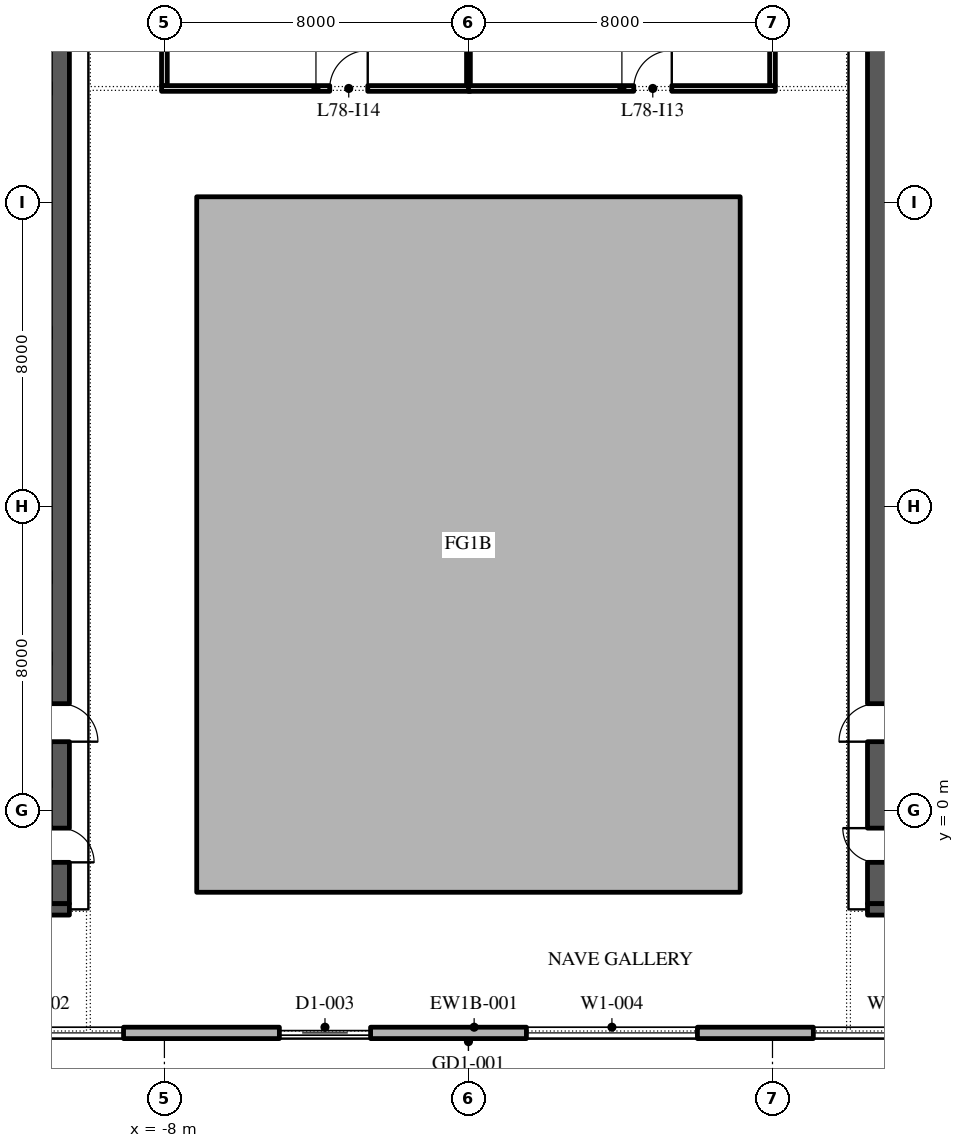
"""IFC4 building model, lengths in metres.
Left out: names, types, materials, properties, quantities, classifications, styles, units other than length and angle.
Written with IfcOpenShell. Run it as: python <this file> out.ifc"""

import sys

from ifc_helpers import new_model, si_unit, direction, frame, frame_2d, origin, place, context, subcontext, project, spatial, polyline, rectangle, outline, extrude, element, fill, save


model = new_model("IFC4")
c1 = context("Model", 3, precision=1e-05, world=origin(), true_north=direction((0.0, 1.0)))
c2 = subcontext(c1, "Body", "Model", "MODEL_VIEW")
j1 = project(units=[si_unit("LENGTHUNIT", "METRE"), si_unit("PLANEANGLEUNIT", "RADIAN")], contexts=[c1])
p1 = place(None, origin())
s1 = spatial("IfcSite", under=j1, at=p1, CompositionType="ELEMENT")
p2 = place(p1, origin())
s2 = spatial("IfcBuilding", under=s1, at=p2, CompositionType="ELEMENT")
p3 = place(p2, frame((0.0, 0.0, 355.2)))
s3 = spatial("IfcBuildingStorey", under=s2, at=p3, CompositionType="ELEMENT", Elevation=355.2)
p4 = place(p3, origin())
e1 = element("IfcWall", 1, at=p4, inside=s3, PredefinedType="STANDARD", context=c2, shape_type="SweptSolid", body=[
    extrude(outline(polyline([(-7.15, -2.15), (7.15, -2.15), (7.15, 16.15), (-7.15, 16.15), (-7.15, -2.15)]), holes=[polyline([(-7.0, -2.0), (-7.0, 16.0), (7.0, 16.0), (7.0, -2.0), (-7.0, -2.0)])]), origin(), (0.0, 0.0, 1.0), 3.95),
])
p5 = place(p3, frame((-22.35, -5.85, 0.0), z_axis=(0.0, 0.0, 1.0), x_axis=(1.0, 0.0, 0.0)))
e2 = element("IfcWall", 2, at=p5, inside=s3, PredefinedType="STANDARD", context=c2, shape_type="SweptSolid", body=[
    extrude(rectangle(XDim=45.0, YDim=0.3, at=frame_2d((22.5, 0.0))), origin(), (0.0, 0.0, 1.0), 3.95),
])
p6 = place(p5, frame((1.375, 0.0, 0.45)))
e3 = element("IfcOpeningElement", 3, at=p6, cuts=e2, PredefinedType="OPENING", context=c2, shape_type="SweptSolid", body=[
    extrude(rectangle(XDim=4.5, YDim=3.05, at=frame_2d((2.25, 1.525))), frame((0.0, 0.16, 0.0), z_axis=(0.0, -1.0, 0.0), x_axis=(1.0, 0.0, 0.0)), (0.0, 0.0, 1.0), 0.32),
])
p7 = place(p5, frame((8.775, 0.0, 0.45)))
e4 = element("IfcOpeningElement", 4, at=p7, cuts=e2, PredefinedType="OPENING", context=c2, shape_type="SweptSolid", body=[
    extrude(rectangle(XDim=4.5, YDim=3.05, at=frame_2d((2.25, 1.525))), frame((0.0, 0.16, 0.0), z_axis=(0.0, -1.0, 0.0), x_axis=(1.0, 0.0, 0.0)), (0.0, 0.0, 1.0), 0.32),
])
p8 = place(p5, frame((17.375, 0.0, 0.0)))
e5 = element("IfcOpeningElement", 5, at=p8, cuts=e2, PredefinedType="OPENING", context=c2, shape_type="SweptSolid", body=[
    extrude(rectangle(XDim=2.4, YDim=3.5, at=frame_2d((1.2, 1.75))), frame((0.0, 0.16, 0.0), z_axis=(0.0, -1.0, 0.0), x_axis=(1.0, 0.0, 0.0)), (0.0, 0.0, 1.0), 0.32),
])
p9 = place(p5, frame((23.875, 0.0, 0.45)))
e6 = element("IfcOpeningElement", 6, at=p9, cuts=e2, PredefinedType="OPENING", context=c2, shape_type="SweptSolid", body=[
    extrude(rectangle(XDim=4.5, YDim=3.05, at=frame_2d((2.25, 1.525))), frame((0.0, 0.16, 0.0), z_axis=(0.0, -1.0, 0.0), x_axis=(1.0, 0.0, 0.0)), (0.0, 0.0, 1.0), 0.32),
])
p10 = place(p5, frame((31.425, 0.0, 0.45)))
e7 = element("IfcOpeningElement", 7, at=p10, cuts=e2, PredefinedType="OPENING", context=c2, shape_type="SweptSolid", body=[
    extrude(rectangle(XDim=4.5, YDim=3.05, at=frame_2d((2.25, 1.525))), frame((0.0, 0.16, 0.0), z_axis=(0.0, -1.0, 0.0), x_axis=(1.0, 0.0, 0.0)), (0.0, 0.0, 1.0), 0.32),
])
p11 = place(p5, frame((38.975, 0.0, 0.45)))
e8 = element("IfcOpeningElement", 8, at=p11, cuts=e2, PredefinedType="OPENING", context=c2, shape_type="SweptSolid", body=[
    extrude(rectangle(XDim=4.5, YDim=3.05, at=frame_2d((2.25, 1.525))), frame((0.0, 0.16, 0.0), z_axis=(0.0, -1.0, 0.0), x_axis=(1.0, 0.0, 0.0)), (0.0, 0.0, 1.0), 0.32),
])
p12 = place(p3, frame((-10.75, -2.45, 0.0), z_axis=(0.0, 0.0, 1.0), x_axis=(0.0, 1.0, 0.0)))
e9 = element("IfcWall", 9, at=p12, inside=s3, PredefinedType="SHEAR", context=c2, shape_type="SweptSolid", body=[
    extrude(rectangle(XDim=27.9, YDim=0.5, at=frame_2d((13.95, 0.0))), origin(), (0.0, 0.0, 1.0), 3.95),
])
p13 = place(p12, frame((23.65, 0.0, 0.0)))
e10 = element("IfcOpeningElement", 10, at=p13, cuts=e9, PredefinedType="OPENING", context=c2, shape_type="SweptSolid", body=[
    extrude(rectangle(XDim=2.4, YDim=2.1, at=frame_2d((1.2, 1.05))), frame((0.0, 0.26, 0.0), z_axis=(0.0, -1.0, 0.0), x_axis=(1.0, 0.0, 0.0)), (0.0, 0.0, 1.0), 0.52),
])
p14 = place(p12, frame((1.087, 0.0, 0.0)))
e11 = element("IfcOpeningElement", 11, at=p14, cuts=e9, PredefinedType="OPENING", context=c2, shape_type="SweptSolid", body=[
    extrude(rectangle(XDim=0.9, YDim=2.1, at=frame_2d((0.45, 1.05))), frame((0.0, 0.26, 0.0), z_axis=(0.0, -1.0, 0.0), x_axis=(1.0, 0.0, 0.0)), (0.0, 0.0, 1.0), 0.52),
])
p15 = place(p12, frame((4.262, 0.0, 0.0)))
e12 = element("IfcOpeningElement", 12, at=p15, cuts=e9, PredefinedType="OPENING", context=c2, shape_type="SweptSolid", body=[
    extrude(rectangle(XDim=1.0, YDim=2.1, at=frame_2d((0.5, 1.05))), frame((0.0, 0.26, 0.0), z_axis=(0.0, -1.0, 0.0), x_axis=(1.0, 0.0, 0.0)), (0.0, 0.0, 1.0), 0.52),
])
p16 = place(p3, frame((-21.5, -2.6, 0.0), z_axis=(0.0, 0.0, 1.0), x_axis=(1.0, 0.0, 0.0)))
e13 = element("IfcWall", 13, at=p16, inside=s3, PredefinedType="SHEAR", context=c2, shape_type="SweptSolid", body=[
    extrude(rectangle(XDim=11.0, YDim=0.3, at=frame_2d((5.5, 0.0))), origin(), (0.0, 0.0, 1.0), 3.95),
])
p17 = place(p3, frame((10.75, -2.45, 0.0), z_axis=(0.0, 0.0, 1.0), x_axis=(0.0, 1.0, 0.0)))
e14 = element("IfcWall", 14, at=p17, inside=s3, PredefinedType="SHEAR", context=c2, shape_type="SweptSolid", body=[
    extrude(rectangle(XDim=27.9, YDim=0.5, at=frame_2d((13.95, 0.0))), origin(), (0.0, 0.0, 1.0), 3.95),
])
p18 = place(p17, frame((23.65, 0.0, 0.0)))
e15 = element("IfcOpeningElement", 15, at=p18, cuts=e14, PredefinedType="OPENING", context=c2, shape_type="SweptSolid", body=[
    extrude(rectangle(XDim=2.4, YDim=2.1, at=frame_2d((1.2, 1.05))), frame((0.0, 0.26, 0.0), z_axis=(0.0, -1.0, 0.0), x_axis=(1.0, 0.0, 0.0)), (0.0, 0.0, 1.0), 0.52),
])
p19 = place(p17, frame((1.087, 0.0, 0.0)))
e16 = element("IfcOpeningElement", 16, at=p19, cuts=e14, PredefinedType="OPENING", context=c2, shape_type="SweptSolid", body=[
    extrude(rectangle(XDim=0.9, YDim=2.1, at=frame_2d((0.45, 1.05))), frame((0.0, 0.26, 0.0), z_axis=(0.0, -1.0, 0.0), x_axis=(1.0, 0.0, 0.0)), (0.0, 0.0, 1.0), 0.52),
])
p20 = place(p17, frame((4.262, 0.0, 0.0)))
e17 = element("IfcOpeningElement", 17, at=p20, cuts=e14, PredefinedType="OPENING", context=c2, shape_type="SweptSolid", body=[
    extrude(rectangle(XDim=1.0, YDim=2.1, at=frame_2d((0.5, 1.05))), frame((0.0, 0.26, 0.0), z_axis=(0.0, -1.0, 0.0), x_axis=(1.0, 0.0, 0.0)), (0.0, 0.0, 1.0), 0.52),
])
p21 = place(p3, frame((10.5, -2.6, 0.0), z_axis=(0.0, 0.0, 1.0), x_axis=(1.0, 0.0, 0.0)))
e18 = element("IfcWall", 18, at=p21, inside=s3, PredefinedType="SHEAR", context=c2, shape_type="SweptSolid", body=[
    extrude(rectangle(XDim=11.0, YDim=0.3, at=frame_2d((5.5, 0.0))), origin(), (0.0, 0.0, 1.0), 3.95),
])
p22 = place(p3, frame((-8.075, 19.0, 0.0), z_axis=(0.0, 0.0, 1.0), x_axis=(1.0, 0.0, 0.0)))
e19 = element("IfcWall", 19, at=p22, inside=s3, PredefinedType="PARTITIONING", context=c2, shape_type="SweptSolid", body=[
    extrude(rectangle(XDim=8.125, YDim=0.15, at=frame_2d((4.062, 0.0))), origin(), (0.0, 0.0, 1.0), 3.95),
])
p23 = place(p22, frame((4.425, 0.0, 0.0)))
e20 = element("IfcOpeningElement", 20, at=p23, cuts=e19, PredefinedType="OPENING", context=c2, shape_type="SweptSolid", body=[
    extrude(rectangle(XDim=1.0, YDim=2.1, at=frame_2d((0.5, 1.05))), frame((0.0, 0.085, 0.0), z_axis=(0.0, -1.0, 0.0), x_axis=(1.0, 0.0, 0.0)), (0.0, 0.0, 1.0), 0.17),
])
p24 = place(p3, frame((-8.0, 26.45, 0.0), z_axis=(0.0, 0.0, 1.0), x_axis=(0.0, -1.0, 0.0)))
e21 = element("IfcWall", 21, at=p24, inside=s3, PredefinedType="PARTITIONING", context=c2, shape_type="SweptSolid", body=[
    extrude(rectangle(XDim=7.375, YDim=0.15, at=frame_2d((3.688, 0.0))), origin(), (0.0, 0.0, 1.0), 3.95),
])
p25 = place(p3, frame((0.0, 19.075, 0.0), z_axis=(0.0, 0.0, 1.0), x_axis=(0.0, 1.0, 0.0)))
e22 = element("IfcWall", 22, at=p25, inside=s3, PredefinedType="PARTITIONING", context=c2, shape_type="SweptSolid", body=[
    extrude(rectangle(XDim=7.475, YDim=0.1, at=frame_2d((3.738, 0.0))), origin(), (0.0, 0.0, 1.0), 3.95),
])
p26 = place(p3, frame((0.0, 19.0, 0.0), z_axis=(0.0, 0.0, 1.0), x_axis=(1.0, 0.0, 0.0)))
e23 = element("IfcWall", 23, at=p26, inside=s3, PredefinedType="PARTITIONING", context=c2, shape_type="SweptSolid", body=[
    extrude(rectangle(XDim=8.075, YDim=0.15, at=frame_2d((4.038, 0.0))), origin(), (0.0, 0.0, 1.0), 3.95),
])
p27 = place(p26, frame((4.35, 0.0, 0.0)))
e24 = element("IfcOpeningElement", 24, at=p27, cuts=e23, PredefinedType="OPENING", context=c2, shape_type="SweptSolid", body=[
    extrude(rectangle(XDim=1.0, YDim=2.1, at=frame_2d((0.5, 1.05))), frame((0.0, 0.085, 0.0), z_axis=(0.0, -1.0, 0.0), x_axis=(1.0, 0.0, 0.0)), (0.0, 0.0, 1.0), 0.17),
])
p28 = place(p3, frame((8.0, 19.075, 0.0), z_axis=(0.0, 0.0, 1.0), x_axis=(0.0, 1.0, 0.0)))
e25 = element("IfcWall", 25, at=p28, inside=s3, PredefinedType="PARTITIONING", context=c2, shape_type="SweptSolid", body=[
    extrude(rectangle(XDim=7.425, YDim=0.15, at=frame_2d((3.712, 0.0))), origin(), (0.0, 0.0, 1.0), 3.95),
])
p29 = place(p7, origin())
e26 = element("IfcWindow", 26, at=p29, inside=s3, PartitioningType="DOUBLE_PANEL_VERTICAL", PredefinedType="WINDOW", context=c2, shape_type="SweptSolid", body=[
    extrude(rectangle(XDim=4.5, YDim=3.05, at=frame_2d((2.25, 1.525))), frame((0.0, 0.03, 0.0), z_axis=(0.0, -1.0, 0.0), x_axis=(1.0, 0.0, 0.0)), (0.0, 0.0, 1.0), 0.06),
])
fill(e4, e26)
p30 = place(p8, origin())
e27 = element("IfcDoor", 27, at=p30, inside=s3, OperationType="DOUBLE_DOOR_SLIDING", PredefinedType="DOOR", context=c2, shape_type="SweptSolid", body=[
    extrude(rectangle(XDim=2.4, YDim=3.5, at=frame_2d((1.2, 1.75))), frame((0.0, 0.025, 0.0), z_axis=(0.0, -1.0, 0.0), x_axis=(1.0, 0.0, 0.0)), (0.0, 0.0, 1.0), 0.05),
])
fill(e5, e27)
p31 = place(p9, origin())
e28 = element("IfcWindow", 28, at=p31, inside=s3, PartitioningType="DOUBLE_PANEL_VERTICAL", PredefinedType="WINDOW", context=c2, shape_type="SweptSolid", body=[
    extrude(rectangle(XDim=4.5, YDim=3.05, at=frame_2d((2.25, 1.525))), frame((0.0, 0.03, 0.0), z_axis=(0.0, -1.0, 0.0), x_axis=(1.0, 0.0, 0.0)), (0.0, 0.0, 1.0), 0.06),
])
fill(e6, e28)
p32 = place(p10, origin())
e29 = element("IfcWindow", 29, at=p32, inside=s3, PartitioningType="DOUBLE_PANEL_VERTICAL", PredefinedType="WINDOW", context=c2, shape_type="SweptSolid", body=[
    extrude(rectangle(XDim=4.5, YDim=3.05, at=frame_2d((2.25, 1.525))), frame((0.0, 0.03, 0.0), z_axis=(0.0, -1.0, 0.0), x_axis=(1.0, 0.0, 0.0)), (0.0, 0.0, 1.0), 0.06),
])
fill(e7, e29)
p33 = place(p27, origin())
e30 = element("IfcDoor", 30, at=p33, inside=s3, OperationType="SINGLE_SWING_LEFT", PredefinedType="DOOR", context=c2, shape_type="SweptSolid", body=[
    extrude(rectangle(XDim=1.0, YDim=2.1, at=frame_2d((0.5, 1.05))), frame((0.0, 0.025, 0.0), z_axis=(0.0, -1.0, 0.0), x_axis=(1.0, 0.0, 0.0)), (0.0, 0.0, 1.0), 0.05),
])
fill(e24, e30)
p34 = place(p23, origin())
e31 = element("IfcDoor", 31, at=p34, inside=s3, OperationType="SINGLE_SWING_LEFT", PredefinedType="DOOR", context=c2, shape_type="SweptSolid", body=[
    extrude(rectangle(XDim=1.0, YDim=2.1, at=frame_2d((0.5, 1.05))), frame((0.0, 0.025, 0.0), z_axis=(0.0, -1.0, 0.0), x_axis=(1.0, 0.0, 0.0)), (0.0, 0.0, 1.0), 0.05),
])
fill(e20, e31)
save(model, sys.argv[1])
